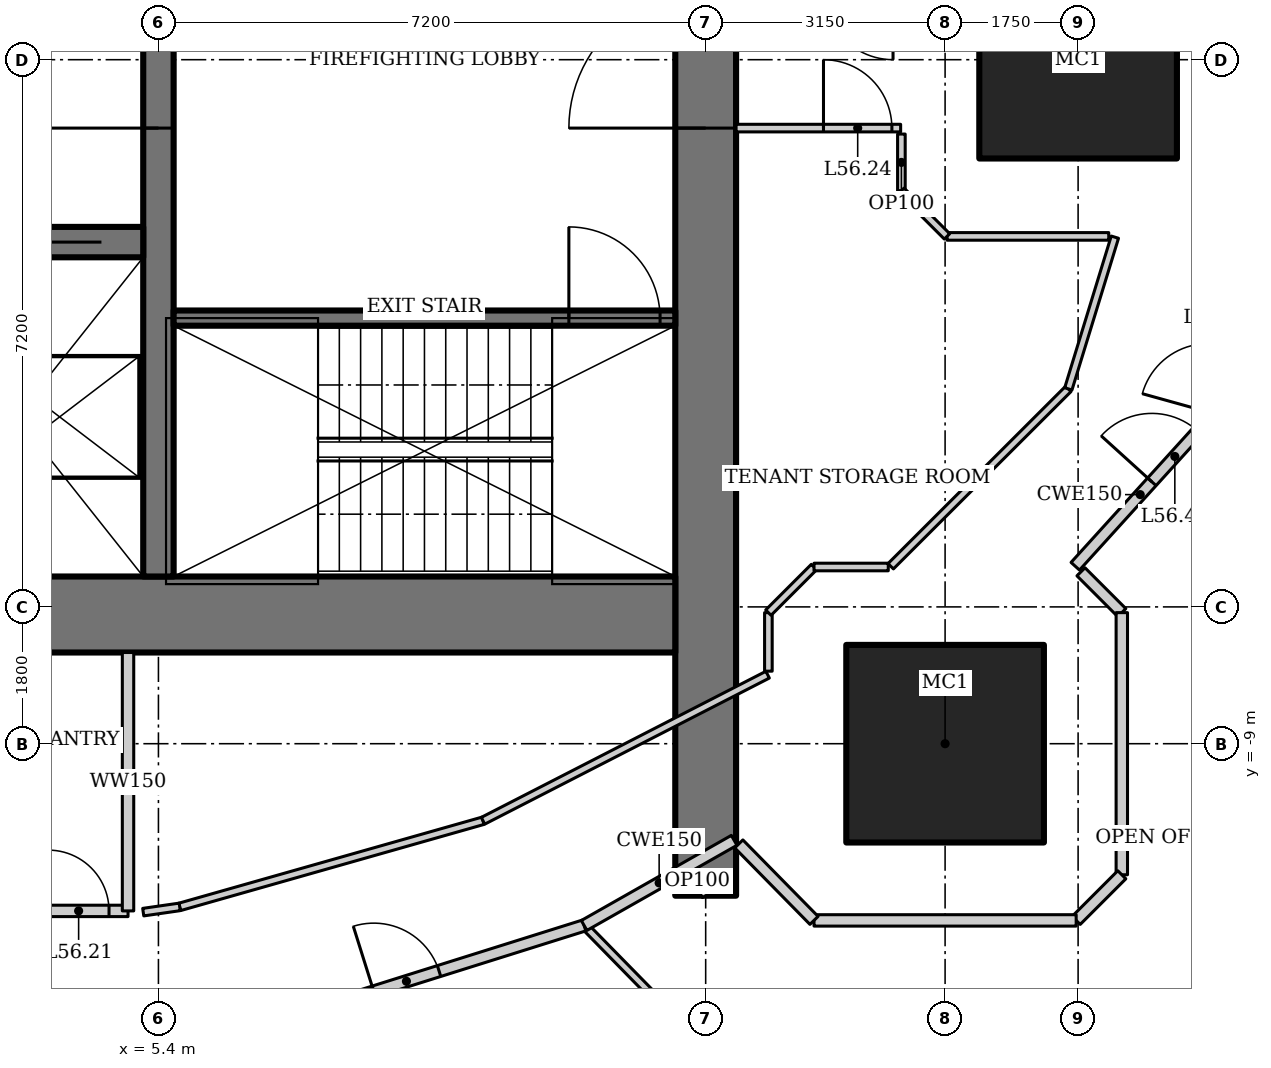
"""IFC4 building model, lengths in metres.
Left out: names, types, materials, properties, quantities, classifications, styles, units other than length and angle.
Written with IfcOpenShell. Run it as: python <this file> out.ifc"""

import sys

from ifc_helpers import new_model, si_unit, direction, frame, frame_2d, origin, origin_2d, place, context, subcontext, project, spatial, rectangle, hollow_rectangle, extrude, element, fill, save


model = new_model("IFC4")
c1 = context("Model", 3, precision=1e-05, world=origin(), true_north=direction((0.0, 1.0)))
c2 = subcontext(c1, "Body", "Model", "MODEL_VIEW")
j1 = project(units=[si_unit("LENGTHUNIT", "METRE"), si_unit("PLANEANGLEUNIT", "RADIAN")], contexts=[c1])
p1 = place(None, origin())
s1 = spatial("IfcSite", under=j1, at=p1, CompositionType="ELEMENT")
p2 = place(p1, origin())
s2 = spatial("IfcBuilding", under=s1, at=p2, CompositionType="ELEMENT")
p3 = place(p2, frame((0.0, 0.0, 241.0)))
s3 = spatial("IfcBuildingStorey", under=s2, at=p3, CompositionType="ELEMENT", Elevation=241.0)
for number, where, z_axis, x_axis in (
    (1, (17.5, 0.0, 0.0), (0.0, 0.0, 1.0), (1.0, 0.0, 0.0)),
    (2, (15.75, -9.0, 0.0), (0.0, 0.0, 1.0), (1.0, 0.0, 0.0)),
):
    element("IfcColumn", number, at=place(p3, frame(where, z_axis=z_axis, x_axis=x_axis)), inside=s3, PredefinedType="COLUMN", context=c2, shape_type="SweptSolid", body=[
        extrude(hollow_rectangle(XDim=2.6, YDim=2.6, WallThickness=0.13, at=origin_2d()), origin(), (0.0, 0.0, 1.0), 4.2),
    ])
p4 = place(p3, frame((12.6, -11.0, 0.0), z_axis=(0.0, 0.0, 1.0), x_axis=(0.0, 1.0, 0.0)))
e3 = element("IfcWall", 3, at=p4, inside=s3, PredefinedType="SHEAR", context=c2, shape_type="SweptSolid", body=[
    extrude(rectangle(XDim=22.0, YDim=0.8, at=frame_2d((11.0, 0.0))), origin(), (0.0, 0.0, 1.0), 4.2),
])
p5 = place(p4, frame((10.1, 0.0, 0.0)))
e4 = element("IfcOpeningElement", 4, at=p5, cuts=e3, PredefinedType="OPENING", context=c2, shape_type="SweptSolid", body=[
    extrude(rectangle(XDim=1.8, YDim=2.1, at=frame_2d((0.9, 1.05))), frame((0.0, 0.41, 0.0), z_axis=(0.0, -1.0, 0.0), x_axis=(1.0, 0.0, 0.0)), (0.0, 0.0, 1.0), 0.82),
])
p6 = place(p3, frame((-12.2, -7.3, 0.0), z_axis=(0.0, 0.0, 1.0), x_axis=(1.0, 0.0, 0.0)))
e5 = element("IfcWall", 5, at=p6, inside=s3, PredefinedType="SHEAR", context=c2, shape_type="SweptSolid", body=[
    extrude(rectangle(XDim=24.4, YDim=1.0, at=frame_2d((12.2, 0.0))), origin(), (0.0, 0.0, 1.0), 4.2),
])
p7 = place(p3, frame((5.4, -6.8, 0.0), z_axis=(0.0, 0.0, 1.0), x_axis=(0.0, 1.0, 0.0)))
e6 = element("IfcWall", 6, at=p7, inside=s3, PredefinedType="SHEAR", context=c2, shape_type="SweptSolid", body=[
    extrude(rectangle(XDim=14.6, YDim=0.4, at=frame_2d((7.3, 0.0))), origin(), (0.0, 0.0, 1.0), 4.2),
])
p8 = place(p7, frame((5.9, 0.0, 0.0)))
e7 = element("IfcOpeningElement", 7, at=p8, cuts=e6, PredefinedType="OPENING", context=c2, shape_type="SweptSolid", body=[
    extrude(rectangle(XDim=1.8, YDim=2.1, at=frame_2d((0.9, 1.05))), frame((0.0, 0.21, 0.0), z_axis=(0.0, -1.0, 0.0), x_axis=(1.0, 0.0, 0.0)), (0.0, 0.0, 1.0), 0.42),
])
p9 = place(p3, frame((-5.2, -2.4, 0.0), z_axis=(0.0, 0.0, 1.0), x_axis=(1.0, 0.0, 0.0)))
e8 = element("IfcWall", 8, at=p9, inside=s3, PredefinedType="SHEAR", context=c2, shape_type="SweptSolid", body=[
    extrude(rectangle(XDim=10.4, YDim=0.4, at=frame_2d((5.2, 0.0))), origin(), (0.0, 0.0, 1.0), 4.2),
])
p10 = place(p9, frame((1.683, 0.0, 0.0)))
e9 = element("IfcOpeningElement", 9, at=p10, cuts=e8, PredefinedType="OPENING", context=c2, shape_type="SweptSolid", body=[
    extrude(rectangle(XDim=1.1, YDim=2.2, at=frame_2d((0.55, 1.1))), frame((0.0, 0.21, 0.0), z_axis=(0.0, -1.0, 0.0), x_axis=(1.0, 0.0, 0.0)), (0.0, 0.0, 1.0), 0.42),
])
p11 = place(p9, frame((5.217, 0.0, 0.0)))
e10 = element("IfcOpeningElement", 10, at=p11, cuts=e8, PredefinedType="OPENING", context=c2, shape_type="SweptSolid", body=[
    extrude(rectangle(XDim=1.1, YDim=2.2, at=frame_2d((0.55, 1.1))), frame((0.0, 0.21, 0.0), z_axis=(0.0, -1.0, 0.0), x_axis=(1.0, 0.0, 0.0)), (0.0, 0.0, 1.0), 0.42),
])
p12 = place(p9, frame((8.75, 0.0, 0.0)))
e11 = element("IfcOpeningElement", 11, at=p12, cuts=e8, PredefinedType="OPENING", context=c2, shape_type="SweptSolid", body=[
    extrude(rectangle(XDim=1.1, YDim=2.2, at=frame_2d((0.55, 1.1))), frame((0.0, 0.21, 0.0), z_axis=(0.0, -1.0, 0.0), x_axis=(1.0, 0.0, 0.0)), (0.0, 0.0, 1.0), 0.42),
])
p13 = place(p3, frame((5.6, -3.4, 0.0), z_axis=(0.0, 0.0, 1.0), x_axis=(1.0, 0.0, 0.0)))
e12 = element("IfcWall", 12, at=p13, inside=s3, PredefinedType="SHEAR", context=c2, shape_type="SweptSolid", body=[
    extrude(rectangle(XDim=6.6, YDim=0.2, at=frame_2d((3.3, 0.0))), origin(), (0.0, 0.0, 1.0), 4.2),
])
p14 = place(p13, frame((5.2, 0.0, 0.0)))
e13 = element("IfcOpeningElement", 13, at=p14, cuts=e12, PredefinedType="OPENING", context=c2, shape_type="SweptSolid", body=[
    extrude(rectangle(XDim=1.2, YDim=2.1, at=frame_2d((0.6, 1.05))), frame((0.0, 0.11, 0.0), z_axis=(0.0, -1.0, 0.0), x_axis=(1.0, 0.0, 0.0)), (0.0, 0.0, 1.0), 0.22),
])
p15 = place(p3, frame((15.709, -16.199, 0.0), z_axis=(0.0, 0.0, 1.0), x_axis=(-0.699758297028, 0.71437967898, 0.0)))
e14 = element("IfcWall", 14, at=p15, inside=s3, PredefinedType="PARTITIONING", context=c2, shape_type="SweptSolid", body=[
    extrude(rectangle(XDim=6.729, YDim=0.1, at=frame_2d((3.365, 0.0))), origin(), (0.0, 0.0, 1.0), 3.41),
])
p16 = place(p3, frame((6.521, -12.799, 0.0), z_axis=(0.0, 0.0, 1.0), x_axis=(0.954031103669, 0.299707612903, 0.0)))
e15 = element("IfcWall", 15, at=p16, inside=s3, PredefinedType="PARTITIONING", context=c2, shape_type="SweptSolid", body=[
    extrude(rectangle(XDim=4.695, YDim=0.15, at=frame_2d((2.348, 0.0))), origin(), (0.0, 0.0, 1.0), 4.05),
])
p17 = place(p16, frame((1.795, 0.0, 0.0)))
e16 = element("IfcOpeningElement", 16, at=p17, cuts=e15, PredefinedType="OPENING", context=c2, shape_type="SweptSolid", body=[
    extrude(rectangle(XDim=0.9, YDim=2.1, at=frame_2d((0.45, 1.05))), frame((0.0, 0.085, 0.0), z_axis=(0.0, -1.0, 0.0), x_axis=(1.0, 0.0, 0.0)), (0.0, 0.0, 1.0), 0.17),
])
p18 = place(p3, frame((-5.0, -11.2, 0.0), z_axis=(0.0, 0.0, 1.0), x_axis=(1.0, 0.0, 0.0)))
e17 = element("IfcWall", 17, at=p18, inside=s3, PredefinedType="SOLIDWALL", context=c2, shape_type="SweptSolid", body=[
    extrude(rectangle(XDim=10.0, YDim=0.15, at=frame_2d((5.0, 0.0))), origin(), (0.0, 0.0, 1.0), 4.05),
])
p19 = place(p18, frame((0.45, 0.0, 0.0)))
e18 = element("IfcOpeningElement", 18, at=p19, cuts=e17, PredefinedType="OPENING", context=c2, shape_type="SweptSolid", body=[
    extrude(rectangle(XDim=1.0, YDim=2.1, at=frame_2d((0.5, 1.05))), frame((0.0, 0.085, 0.0), z_axis=(0.0, -1.0, 0.0), x_axis=(1.0, 0.0, 0.0)), (0.0, 0.0, 1.0), 0.17),
])
p20 = place(p18, frame((3.15, 0.0, 0.0)))
e19 = element("IfcOpeningElement", 19, at=p20, cuts=e17, PredefinedType="OPENING", context=c2, shape_type="SweptSolid", body=[
    extrude(rectangle(XDim=0.9, YDim=2.1, at=frame_2d((0.45, 1.05))), frame((0.0, 0.085, 0.0), z_axis=(0.0, -1.0, 0.0), x_axis=(1.0, 0.0, 0.0)), (0.0, 0.0, 1.0), 0.17),
])
p21 = place(p18, frame((6.55, 0.0, 0.0)))
e20 = element("IfcOpeningElement", 20, at=p21, cuts=e17, PredefinedType="OPENING", context=c2, shape_type="SweptSolid", body=[
    extrude(rectangle(XDim=0.9, YDim=2.1, at=frame_2d((0.45, 1.05))), frame((0.0, 0.085, 0.0), z_axis=(0.0, -1.0, 0.0), x_axis=(1.0, 0.0, 0.0)), (0.0, 0.0, 1.0), 0.17),
])
p22 = place(p18, frame((8.95, 0.0, 0.0)))
e21 = element("IfcOpeningElement", 21, at=p22, cuts=e17, PredefinedType="OPENING", context=c2, shape_type="SweptSolid", body=[
    extrude(rectangle(XDim=0.8, YDim=2.1, at=frame_2d((0.4, 1.05))), frame((0.0, 0.085, 0.0), z_axis=(0.0, -1.0, 0.0), x_axis=(1.0, 0.0, 0.0)), (0.0, 0.0, 1.0), 0.17),
])
p23 = place(p3, frame((5.0, -7.8, 0.0), z_axis=(0.0, 0.0, 1.0), x_axis=(0.0, -1.0, 0.0)))
e22 = element("IfcWall", 22, at=p23, inside=s3, PredefinedType="SOLIDWALL", context=c2, shape_type="SweptSolid", body=[
    extrude(rectangle(XDim=3.4, YDim=0.15, at=frame_2d((1.7, 0.0))), origin(), (0.0, 0.0, 1.0), 4.05),
])
p24 = place(p3, frame((9.67, -10.014, 0.0), z_axis=(0.0, 0.0, 1.0), x_axis=(-0.961973498971, -0.273142796496, 0.0)))
e23 = element("IfcWall", 23, at=p24, inside=s3, PredefinedType="PARTITIONING", context=c2, shape_type="SweptSolid", body=[
    extrude(rectangle(XDim=4.148, YDim=0.1, at=frame_2d((2.074, 0.0))), origin(), (0.0, 0.0, 1.0), 4.05),
])
p25 = place(p3, frame((5.68, -11.147, 0.0), z_axis=(0.0, 0.0, 1.0), x_axis=(-0.989797891768, -0.142478536811, 0.0)))
e24 = element("IfcWall", 24, at=p25, inside=s3, PredefinedType="PARTITIONING", context=c2, shape_type="SweptSolid", body=[
    extrude(rectangle(XDim=0.485, YDim=0.1, at=frame_2d((0.242, 0.0))), origin(), (0.0, 0.0, 1.0), 4.05),
])
p26 = place(p3, frame((12.6, -11.0, 0.0), z_axis=(0.0, 0.0, 1.0), x_axis=(-0.493794495037, 0.869578631678, 0.0)))
e25 = element("IfcWall", 25, at=p26, inside=s3, PredefinedType="PARTITIONING", context=c2, shape_type="SweptSolid", body=[
    extrude(rectangle(XDim=0.449, YDim=0.1, at=frame_2d((0.225, 0.0))), origin(), (0.0, 0.0, 1.0), 4.05),
])
p27 = place(p3, frame((11.001, -11.392, 0.0), z_axis=(0.0, 0.0, 1.0), x_axis=(0.869722107117, 0.493541747366, 0.0)))
e26 = element("IfcWall", 26, at=p27, inside=s3, PredefinedType="PARTITIONING", context=c2, shape_type="SweptSolid", body=[
    extrude(rectangle(XDim=2.27, YDim=0.15, at=frame_2d((1.135, 0.0))), origin(), (0.0, 0.0, 1.0), 4.05),
])
p28 = place(p3, frame((17.463, -6.665, 0.0), z_axis=(0.0, 0.0, 1.0), x_axis=(0.671721890643, 0.74080341632, 0.0)))
e27 = element("IfcWall", 27, at=p28, inside=s3, PredefinedType="PARTITIONING", context=c2, shape_type="SweptSolid", body=[
    extrude(rectangle(XDim=2.544, YDim=0.15, at=frame_2d((1.272, 0.0))), origin(), (0.0, 0.0, 1.0), 4.05),
])
p29 = place(p28, frame((1.5, 0.0, 0.0)))
e28 = element("IfcOpeningElement", 28, at=p29, cuts=e27, PredefinedType="OPENING", context=c2, shape_type="SweptSolid", body=[
    extrude(rectangle(XDim=0.9, YDim=2.1, at=frame_2d((0.45, 1.05))), frame((0.0, 0.085, 0.0), z_axis=(0.0, -1.0, 0.0), x_axis=(1.0, 0.0, 0.0)), (0.0, 0.0, 1.0), 0.17),
])
p30 = place(p3, frame((17.372, -4.331, 0.0), z_axis=(0.0, 0.0, 1.0), x_axis=(-0.707587114823, -0.70662612104, 0.0)))
e29 = element("IfcWall", 29, at=p30, inside=s3, PredefinedType="PARTITIONING", context=c2, shape_type="SweptSolid", body=[
    extrude(rectangle(XDim=3.303, YDim=0.1, at=frame_2d((1.651, 0.0))), origin(), (0.0, 0.0, 1.0), 4.05),
])
p31 = place(p3, frame((13.415, -8.092, 0.0), z_axis=(0.0, 0.0, 1.0), x_axis=(-0.889620520549, -0.45670048108, 0.0)))
e30 = element("IfcWall", 30, at=p31, inside=s3, PredefinedType="PARTITIONING", context=c2, shape_type="SweptSolid", body=[
    extrude(rectangle(XDim=4.209, YDim=0.1, at=frame_2d((2.104, 0.0))), origin(), (0.0, 0.0, 1.0), 4.05),
])
p32 = place(p3, frame((13.425, -8.046, 0.0), z_axis=(0.0, 0.0, 1.0), x_axis=(0.0, 1.0, 0.0)))
e31 = element("IfcWall", 31, at=p32, inside=s3, PredefinedType="PARTITIONING", context=c2, shape_type="SweptSolid", body=[
    extrude(rectangle(XDim=0.77, YDim=0.1, at=frame_2d((0.385, 0.0))), origin(), (0.0, 0.0, 1.0), 4.05),
])
p33 = place(p3, frame((13.425, -7.275, 0.0), z_axis=(0.0, 0.0, 1.0), x_axis=(0.707106781187, 0.707106781187, 0.0)))
e32 = element("IfcWall", 32, at=p33, inside=s3, PredefinedType="PARTITIONING", context=c2, shape_type="SweptSolid", body=[
    extrude(rectangle(XDim=0.849, YDim=0.1, at=frame_2d((0.425, 0.0))), origin(), (0.0, 0.0, 1.0), 4.05),
])
p34 = place(p3, frame((14.025, -6.675, 0.0), z_axis=(0.0, 0.0, 1.0), x_axis=(1.0, 0.0, 0.0)))
e33 = element("IfcWall", 33, at=p34, inside=s3, PredefinedType="PARTITIONING", context=c2, shape_type="SweptSolid", body=[
    extrude(rectangle(XDim=0.977, YDim=0.1, at=frame_2d((0.488, 0.0))), origin(), (0.0, 0.0, 1.0), 4.05),
])
p35 = place(p3, frame((17.538, -6.738, 0.0), z_axis=(0.0, 0.0, 1.0), x_axis=(0.707106781187, -0.707106781187, 0.0)))
e34 = element("IfcWall", 34, at=p35, inside=s3, PredefinedType="PARTITIONING", context=c2, shape_type="SweptSolid", body=[
    extrude(rectangle(XDim=0.76, YDim=0.15, at=frame_2d((0.38, 0.0))), origin(), (0.0, 0.0, 1.0), 4.05),
])
p36 = place(p3, frame((18.075, -7.275, 0.0), z_axis=(0.0, 0.0, 1.0), x_axis=(0.0, -1.0, 0.0)))
e35 = element("IfcWall", 35, at=p36, inside=s3, PredefinedType="PARTITIONING", context=c2, shape_type="SweptSolid", body=[
    extrude(rectangle(XDim=3.449, YDim=0.15, at=frame_2d((1.725, 0.0))), origin(), (0.0, 0.0, 1.0), 3.6),
])
p37 = place(p3, frame((18.075, -10.725, 0.0), z_axis=(0.0, 0.0, 1.0), x_axis=(-0.707106781187, -0.707106781187, 0.0)))
e36 = element("IfcWall", 36, at=p37, inside=s3, PredefinedType="PARTITIONING", context=c2, shape_type="SweptSolid", body=[
    extrude(rectangle(XDim=0.849, YDim=0.15, at=frame_2d((0.425, 0.0))), origin(), (0.0, 0.0, 1.0), 4.05),
])
p38 = place(p3, frame((17.475, -11.325, 0.0), z_axis=(0.0, 0.0, 1.0), x_axis=(-1.0, 0.0, 0.0)))
e37 = element("IfcWall", 37, at=p38, inside=s3, PredefinedType="PARTITIONING", context=c2, shape_type="SweptSolid", body=[
    extrude(rectangle(XDim=3.449, YDim=0.15, at=frame_2d((1.725, 0.0))), origin(), (0.0, 0.0, 1.0), 4.05),
])
p39 = place(p3, frame((14.025, -11.325, 0.0), z_axis=(0.0, 0.0, 1.0), x_axis=(-0.701113567316, 0.713049623606, 0.0)))
e38 = element("IfcWall", 38, at=p39, inside=s3, PredefinedType="PARTITIONING", context=c2, shape_type="SweptSolid", body=[
    extrude(rectangle(XDim=1.411, YDim=0.15, at=frame_2d((0.706, 0.0))), origin(), (0.0, 0.0, 1.0), 4.05),
])
p40 = place(p3, frame((13.0, -0.9, 0.0), z_axis=(0.0, 0.0, 1.0), x_axis=(1.0, 0.0, 0.0)))
e39 = element("IfcWall", 39, at=p40, inside=s3, PredefinedType="PARTITIONING", context=c2, shape_type="SweptSolid", body=[
    extrude(rectangle(XDim=2.165, YDim=0.1, at=frame_2d((1.083, 0.0))), origin(), (0.0, 0.0, 1.0), 4.05),
])
p41 = place(p40, frame((1.15, 0.0, 0.0)))
e40 = element("IfcOpeningElement", 40, at=p41, cuts=e39, PredefinedType="OPENING", context=c2, shape_type="SweptSolid", body=[
    extrude(rectangle(XDim=0.9, YDim=2.1, at=frame_2d((0.45, 1.05))), frame((0.0, 0.06, 0.0), z_axis=(0.0, -1.0, 0.0), x_axis=(1.0, 0.0, 0.0)), (0.0, 0.0, 1.0), 0.12),
])
p42 = place(p3, frame((17.984, -2.335, 0.0), z_axis=(0.0, 0.0, 1.0), x_axis=(-0.293231279211, -0.956041535129, 0.0)))
e41 = element("IfcWall", 41, at=p42, inside=s3, PredefinedType="PARTITIONING", context=c2, shape_type="SweptSolid", body=[
    extrude(rectangle(XDim=2.088, YDim=0.1, at=frame_2d((1.044, 0.0))), origin(), (0.0, 0.0, 1.0), 4.05),
])
p43 = place(p3, frame((15.175, -1.725, 0.0), z_axis=(0.0, 0.0, 1.0), x_axis=(0.0, 1.0, 0.0)))
e42 = element("IfcWall", 42, at=p43, inside=s3, PredefinedType="PARTITIONING", context=c2, shape_type="SweptSolid", body=[
    extrude(rectangle(XDim=0.746, YDim=0.1, at=frame_2d((0.373, 0.0))), origin(), (0.0, 0.0, 1.0), 4.05),
])
p44 = place(p3, frame((17.903, -2.325, 0.0), z_axis=(0.0, 0.0, 1.0), x_axis=(-1.0, 0.0, 0.0)))
e43 = element("IfcWall", 43, at=p44, inside=s3, PredefinedType="PARTITIONING", context=c2, shape_type="SweptSolid", body=[
    extrude(rectangle(XDim=2.128, YDim=0.1, at=frame_2d((1.064, 0.0))), origin(), (0.0, 0.0, 1.0), 4.05),
])
p45 = place(p3, frame((15.775, -2.325, 0.0), z_axis=(0.0, 0.0, 1.0), x_axis=(-0.707106781187, 0.707106781187, 0.0)))
e44 = element("IfcWall", 44, at=p45, inside=s3, PredefinedType="PARTITIONING", context=c2, shape_type="SweptSolid", body=[
    extrude(rectangle(XDim=0.849, YDim=0.1, at=frame_2d((0.425, 0.0))), origin(), (0.0, 0.0, 1.0), 4.05),
])
p46 = place(p8, origin())
e45 = element("IfcDoor", 45, at=p46, inside=s3, OperationType="DOUBLE_DOOR_DOUBLE_SWING", PredefinedType="DOOR", context=c2, shape_type="SweptSolid", body=[
    extrude(rectangle(XDim=1.8, YDim=2.1, at=frame_2d((0.9, 1.05))), frame((0.0, 0.025, 0.0), z_axis=(0.0, -1.0, 0.0), x_axis=(1.0, 0.0, 0.0)), (0.0, 0.0, 1.0), 0.05),
])
fill(e7, e45)
p47 = place(p14, origin())
e46 = element("IfcDoor", 46, at=p47, inside=s3, OperationType="SINGLE_SWING_RIGHT", PredefinedType="DOOR", context=c2, shape_type="SweptSolid", body=[
    extrude(rectangle(XDim=1.2, YDim=2.1, at=frame_2d((0.6, 1.05))), frame((0.0, 0.025, 0.0), z_axis=(0.0, -1.0, 0.0), x_axis=(1.0, 0.0, 0.0)), (0.0, 0.0, 1.0), 0.05),
])
fill(e13, e46)
p48 = place(p5, origin())
e47 = element("IfcDoor", 47, at=p48, inside=s3, OperationType="DOUBLE_DOOR_DOUBLE_SWING", PredefinedType="DOOR", context=c2, shape_type="SweptSolid", body=[
    extrude(rectangle(XDim=1.8, YDim=2.1, at=frame_2d((0.9, 1.05))), frame((0.0, 0.025, 0.0), z_axis=(0.0, -1.0, 0.0), x_axis=(1.0, 0.0, 0.0)), (0.0, 0.0, 1.0), 0.05),
])
fill(e4, e47)
p49 = place(p12, origin())
e48 = element("IfcDoor", 48, at=p49, inside=s3, OperationType="DOUBLE_DOOR_SLIDING", PredefinedType="DOOR", context=c2, shape_type="SweptSolid", body=[
    extrude(rectangle(XDim=1.1, YDim=2.2, at=frame_2d((0.55, 1.1))), frame((0.0, 0.025, 0.0), z_axis=(0.0, -1.0, 0.0), x_axis=(1.0, 0.0, 0.0)), (0.0, 0.0, 1.0), 0.05),
])
fill(e11, e48)
p50 = place(p22, origin())
e49 = element("IfcDoor", 49, at=p50, inside=s3, OperationType="SINGLE_SWING_LEFT", PredefinedType="DOOR", context=c2, shape_type="SweptSolid", body=[
    extrude(rectangle(XDim=0.8, YDim=2.1, at=frame_2d((0.4, 1.05))), frame((0.0, 0.025, 0.0), z_axis=(0.0, -1.0, 0.0), x_axis=(1.0, 0.0, 0.0)), (0.0, 0.0, 1.0), 0.05),
])
fill(e21, e49)
p51 = place(p41, origin())
e50 = element("IfcDoor", 50, at=p51, inside=s3, OperationType="SINGLE_SWING_LEFT", PredefinedType="DOOR", context=c2, shape_type="SweptSolid", body=[
    extrude(rectangle(XDim=0.9, YDim=2.1, at=frame_2d((0.45, 1.05))), frame((0.0, 0.025, 0.0), z_axis=(0.0, -1.0, 0.0), x_axis=(1.0, 0.0, 0.0)), (0.0, 0.0, 1.0), 0.05),
])
fill(e40, e50)
p52 = place(p17, origin())
e51 = element("IfcDoor", 51, at=p52, inside=s3, OperationType="SINGLE_SWING_LEFT", PredefinedType="DOOR", context=c2, shape_type="SweptSolid", body=[
    extrude(rectangle(XDim=0.9, YDim=2.1, at=frame_2d((0.45, 1.05))), frame((0.0, 0.025, 0.0), z_axis=(0.0, -1.0, 0.0), x_axis=(1.0, 0.0, 0.0)), (0.0, 0.0, 1.0), 0.05),
])
fill(e16, e51)
p53 = place(p29, origin())
e52 = element("IfcDoor", 52, at=p53, inside=s3, OperationType="SINGLE_SWING_LEFT", PredefinedType="DOOR", context=c2, shape_type="SweptSolid", body=[
    extrude(rectangle(XDim=0.9, YDim=2.1, at=frame_2d((0.45, 1.05))), frame((0.0, 0.025, 0.0), z_axis=(0.0, -1.0, 0.0), x_axis=(1.0, 0.0, 0.0)), (0.0, 0.0, 1.0), 0.05),
])
fill(e28, e52)
save(model, sys.argv[1])
